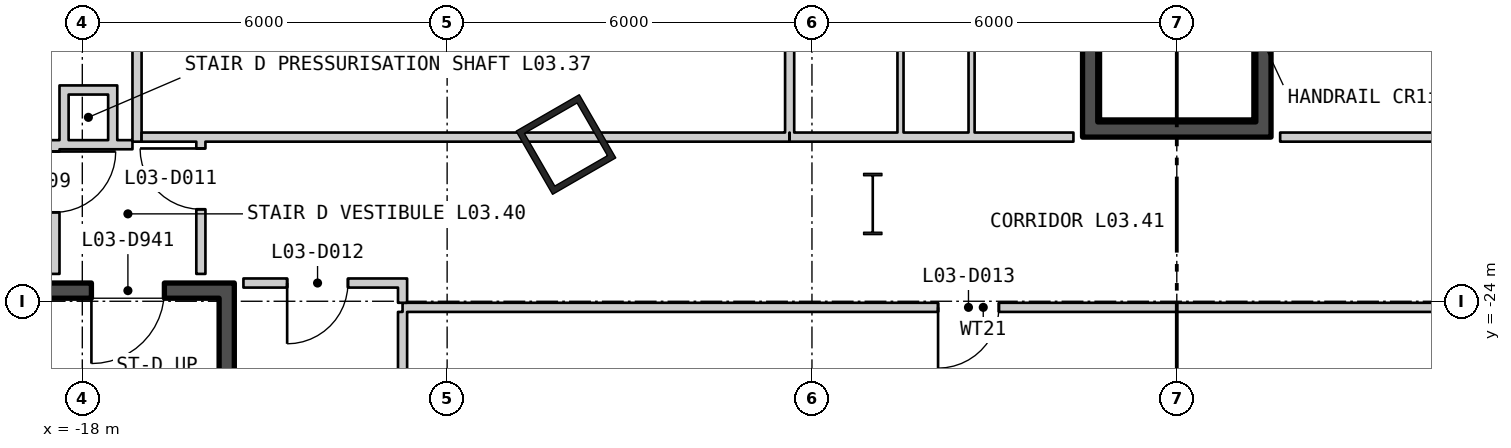
"""IFC4 building model, lengths in metres.
Left out: names, types, materials, properties, quantities, classifications, styles, units other than length and angle.
Written with IfcOpenShell. Run it as: python <this file> out.ifc"""

import sys

from ifc_helpers import new_model, si_unit, direction, frame, frame_2d, origin, origin_2d, place, context, subcontext, project, spatial, rectangle, hollow_rectangle, i_section, extrude, element, fill, save


model = new_model("IFC4")
c1 = context("Model", 3, precision=1e-05, world=origin(), true_north=direction((0.0, 1.0)))
c2 = subcontext(c1, "Body", "Model", "MODEL_VIEW")
j1 = project(units=[si_unit("LENGTHUNIT", "METRE"), si_unit("PLANEANGLEUNIT", "RADIAN")], contexts=[c1])
p1 = place(None, origin())
s1 = spatial("IfcSite", under=j1, at=p1, CompositionType="ELEMENT")
p2 = place(p1, origin())
s2 = spatial("IfcBuilding", under=s1, at=p2, CompositionType="ELEMENT")
p3 = place(p2, frame((0.0, 0.0, 18.6)))
s3 = spatial("IfcBuildingStorey", under=s2, at=p3, CompositionType="ELEMENT", Elevation=18.6)
p4 = place(p3, frame((-10.046, -21.422, 0.0), z_axis=(0.0, 0.0, 1.0), x_axis=(0.5, -0.866025403784, 0.0)))
e1 = element("IfcColumn", 1, at=p4, inside=s3, PredefinedType="COLUMN", context=c2, shape_type="SweptSolid", body=[
    extrude(hollow_rectangle(XDim=1.2, YDim=1.2, WallThickness=0.1, at=origin_2d()), origin(), (0.0, 0.0, 1.0), 5.1),
])
p5 = place(p3, frame((-5.0, -22.4, 0.0), z_axis=(0.0, 0.0, 1.0), x_axis=(1.0, 0.0, 0.0)))
e2 = element("IfcColumn", 2, at=p5, inside=s3, PredefinedType="COLUMN", context=c2, shape_type="SweptSolid", body=[
    extrude(i_section(OverallWidth=0.302, OverallDepth=1.008, WebThickness=0.021, FlangeThickness=0.04, at=origin_2d()), origin(), (0.0, 0.0, 1.0), 5.1),
])
p6 = place(p3, frame((-1.425, -21.05, 0.0), z_axis=(0.0, 0.0, 1.0), x_axis=(0.0, 1.0, 0.0)))
e3 = element("IfcWall", 3, at=p6, inside=s3, PredefinedType="SHEAR", context=c2, shape_type="SweptSolid", body=[
    extrude(rectangle(XDim=7.2, YDim=0.25, at=frame_2d((3.6, 0.0))), origin(), (0.0, 0.0, 1.0), 4.88),
])
p7 = place(p3, frame((1.425, -21.05, 0.0), z_axis=(0.0, 0.0, 1.0), x_axis=(0.0, 1.0, 0.0)))
e4 = element("IfcWall", 4, at=p7, inside=s3, PredefinedType="SHEAR", context=c2, shape_type="SweptSolid", body=[
    extrude(rectangle(XDim=7.2, YDim=0.25, at=frame_2d((3.6, 0.0))), origin(), (0.0, 0.0, 1.0), 4.88),
])
p8 = place(p7, frame((5.89, 0.0, 0.0)))
e5 = element("IfcOpeningElement", 5, at=p8, cuts=e4, PredefinedType="OPENING", context=c2, shape_type="SweptSolid", body=[
    extrude(rectangle(XDim=1.0, YDim=2.1, at=frame_2d((0.5, 1.05))), frame((0.0, 0.135, 0.0), z_axis=(0.0, -1.0, 0.0), x_axis=(1.0, 0.0, 0.0)), (0.0, 0.0, 1.0), 0.27),
])
p9 = place(p3, frame((-1.55, -21.175, 0.0), z_axis=(0.0, 0.0, 1.0), x_axis=(1.0, 0.0, 0.0)))
e6 = element("IfcWall", 6, at=p9, inside=s3, PredefinedType="SHEAR", context=c2, shape_type="SweptSolid", body=[
    extrude(rectangle(XDim=3.1, YDim=0.25, at=frame_2d((1.55, 0.0))), origin(), (0.0, 0.0, 1.0), 4.88),
])
p10 = place(p3, frame((-15.625, -31.25, 0.0), z_axis=(0.0, 0.0, 1.0), x_axis=(0.0, 1.0, 0.0)))
e7 = element("IfcWall", 7, at=p10, inside=s3, PredefinedType="SHEAR", context=c2, shape_type="SweptSolid", body=[
    extrude(rectangle(XDim=7.3, YDim=0.25, at=frame_2d((3.65, 0.0))), origin(), (0.0, 0.0, 1.0), 4.88),
])
p11 = place(p3, frame((-19.0, -23.825, 0.0), z_axis=(0.0, 0.0, 1.0), x_axis=(1.0, 0.0, 0.0)))
e8 = element("IfcWall", 8, at=p11, inside=s3, PredefinedType="SHEAR", context=c2, shape_type="SweptSolid", body=[
    extrude(rectangle(XDim=3.5, YDim=0.25, at=frame_2d((1.75, 0.0))), origin(), (0.0, 0.0, 1.0), 4.88),
])
p12 = place(p11, frame((1.15, 0.0, 0.0)))
e9 = element("IfcOpeningElement", 9, at=p12, cuts=e8, PredefinedType="OPENING", context=c2, shape_type="SweptSolid", body=[
    extrude(rectangle(XDim=1.2, YDim=2.1, at=frame_2d((0.6, 1.05))), frame((0.0, 0.135, 0.0), z_axis=(0.0, -1.0, 0.0), x_axis=(1.0, 0.0, 0.0)), (0.0, 0.0, 1.0), 0.27),
])
p13 = place(p3, frame((-18.45, -23.55, 0.0), z_axis=(0.0, 0.0, 1.0), x_axis=(0.0, 1.0, 0.0)))
e10 = element("IfcWall", 10, at=p13, inside=s3, PredefinedType="PARTITIONING", context=c2, shape_type="SweptSolid", body=[
    extrude(rectangle(XDim=2.2, YDim=0.15, at=frame_2d((1.1, 0.0))), origin(), (0.0, 0.0, 1.0), 4.88),
])
p14 = place(p13, frame((1.013, 0.0, 0.0)))
e11 = element("IfcOpeningElement", 11, at=p14, cuts=e10, PredefinedType="OPENING", context=c2, shape_type="SweptSolid", body=[
    extrude(rectangle(XDim=1.0, YDim=2.1, at=frame_2d((0.5, 1.05))), frame((0.0, 0.085, 0.0), z_axis=(0.0, -1.0, 0.0), x_axis=(1.0, 0.0, 0.0)), (0.0, 0.0, 1.0), 0.17),
])
p15 = place(p3, frame((-18.3, -21.5, 0.0), z_axis=(0.0, 0.0, 1.0), x_axis=(0.0, 1.0, 0.0)))
e12 = element("IfcWall", 12, at=p15, inside=s3, PredefinedType="PARTITIONING", context=c2, shape_type="SweptSolid", body=[
    extrude(rectangle(XDim=1.05, YDim=0.15, at=frame_2d((0.525, 0.0))), origin(), (0.0, 0.0, 1.0), 4.88),
])
for number, where, z_axis, x_axis in (
    (13, (-18.225, -21.425, 0.0), (0.0, 0.0, 1.0), (1.0, 0.0, 0.0)),
    (14, (-18.225, -20.525, 0.0), (0.0, 0.0, 1.0), (1.0, 0.0, 0.0)),
):
    element("IfcWall", number, at=place(p3, frame(where, z_axis=z_axis, x_axis=x_axis)), inside=s3, PredefinedType="PARTITIONING", context=c2, shape_type="SweptSolid", body=[
        extrude(rectangle(XDim=0.65, YDim=0.15, at=frame_2d((0.325, 0.0))), origin(), (0.0, 0.0, 1.0), 4.88),
    ])
p16 = place(p3, frame((-17.5, -21.5, 0.0), z_axis=(0.0, 0.0, 1.0), x_axis=(0.0, 1.0, 0.0)))
e15 = element("IfcWall", 15, at=p16, inside=s3, PredefinedType="PARTITIONING", context=c2, shape_type="SweptSolid", body=[
    extrude(rectangle(XDim=1.05, YDim=0.15, at=frame_2d((0.525, 0.0))), origin(), (0.0, 0.0, 1.0), 4.88),
])
p17 = place(p3, frame((-17.425, -21.425, 0.0), z_axis=(0.0, 0.0, 1.0), x_axis=(1.0, 0.0, 0.0)))
e16 = element("IfcWall", 16, at=p17, inside=s3, PredefinedType="PARTITIONING", context=c2, shape_type="SweptSolid", body=[
    extrude(rectangle(XDim=0.25, YDim=0.15, at=frame_2d((0.125, 0.0))), origin(), (0.0, 0.0, 1.0), 4.88),
])
p18 = place(p3, frame((-17.1, -21.375, 0.0), z_axis=(0.0, 0.0, 1.0), x_axis=(0.0, 1.0, 0.0)))
e17 = element("IfcWall", 17, at=p18, inside=s3, PredefinedType="PARTITIONING", context=c2, shape_type="SweptSolid", body=[
    extrude(rectangle(XDim=19.05, YDim=0.15, at=frame_2d((9.525, 0.0))), origin(), (0.0, 0.0, 1.0), 4.88),
])
p19 = place(p3, frame((-17.025, -21.3, 0.0), z_axis=(0.0, 0.0, 1.0), x_axis=(1.0, 0.0, 0.0)))
e18 = element("IfcWall", 18, at=p19, inside=s3, PredefinedType="PARTITIONING", context=c2, shape_type="SweptSolid", body=[
    extrude(rectangle(XDim=10.655, YDim=0.15, at=frame_2d((5.327, 0.0))), origin(), (0.0, 0.0, 1.0), 4.88),
])
p20 = place(p3, frame((-16.05, -23.55, 0.0), z_axis=(0.0, 0.0, 1.0), x_axis=(0.0, 1.0, 0.0)))
e19 = element("IfcWall", 19, at=p20, inside=s3, PredefinedType="PARTITIONING", context=c2, shape_type="SweptSolid", body=[
    extrude(rectangle(XDim=2.175, YDim=0.15, at=frame_2d((1.087, 0.0))), origin(), (0.0, 0.0, 1.0), 4.88),
])
p21 = place(p20, frame((1.063, 0.0, 0.0)))
e20 = element("IfcOpeningElement", 20, at=p21, cuts=e19, PredefinedType="OPENING", context=c2, shape_type="SweptSolid", body=[
    extrude(rectangle(XDim=1.0, YDim=2.1, at=frame_2d((0.5, 1.05))), frame((0.0, 0.085, 0.0), z_axis=(0.0, -1.0, 0.0), x_axis=(1.0, 0.0, 0.0)), (0.0, 0.0, 1.0), 0.17),
])
p22 = place(p3, frame((-15.35, -23.7, 0.0), z_axis=(0.0, 0.0, 1.0), x_axis=(1.0, 0.0, 0.0)))
e21 = element("IfcWall", 21, at=p22, inside=s3, PredefinedType="PARTITIONING", context=c2, shape_type="SweptSolid", body=[
    extrude(rectangle(XDim=2.542, YDim=0.15, at=frame_2d((1.271, 0.0))), origin(), (0.0, 0.0, 1.0), 4.88),
])
p23 = place(p22, frame((0.719, 0.0, 0.0)))
e22 = element("IfcOpeningElement", 22, at=p23, cuts=e21, PredefinedType="OPENING", context=c2, shape_type="SweptSolid", body=[
    extrude(rectangle(XDim=1.0, YDim=2.1, at=frame_2d((0.5, 1.05))), frame((0.0, 0.085, 0.0), z_axis=(0.0, -1.0, 0.0), x_axis=(1.0, 0.0, 0.0)), (0.0, 0.0, 1.0), 0.17),
])
p24 = place(p3, frame((-12.733, -32.9, 0.0), z_axis=(0.0, 0.0, 1.0), x_axis=(0.0, 1.0, 0.0)))
e23 = element("IfcWall", 23, at=p24, inside=s3, PredefinedType="PARTITIONING", context=c2, shape_type="SweptSolid", body=[
    extrude(rectangle(XDim=8.725, YDim=0.15, at=frame_2d((4.362, 0.0))), origin(), (0.0, 0.0, 1.0), 4.19),
])
p25 = place(p3, frame((-12.733, -24.1, 0.0), z_axis=(0.0, 0.0, 1.0), x_axis=(1.0, 0.0, 0.0)))
e24 = element("IfcWall", 24, at=p25, inside=s3, PredefinedType="PARTITIONING", context=c2, shape_type="SweptSolid", body=[
    extrude(rectangle(XDim=19.1, YDim=0.15, at=frame_2d((9.55, 0.0))), origin(), (0.0, 0.0, 1.0), 4.88),
])
p26 = place(p25, frame((8.807, 0.0, 0.0)))
e25 = element("IfcOpeningElement", 25, at=p26, cuts=e24, PredefinedType="OPENING", context=c2, shape_type="SweptSolid", body=[
    extrude(rectangle(XDim=1.0, YDim=2.1, at=frame_2d((0.5, 1.05))), frame((0.0, 0.085, 0.0), z_axis=(0.0, -1.0, 0.0), x_axis=(1.0, 0.0, 0.0)), (0.0, 0.0, 1.0), 0.17),
])
p27 = place(p3, frame((-12.733, -24.025, 0.0), z_axis=(0.0, 0.0, 1.0), x_axis=(0.0, 1.0, 0.0)))
e26 = element("IfcWall", 26, at=p27, inside=s3, PredefinedType="PARTITIONING", context=c2, shape_type="SweptSolid", body=[
    extrude(rectangle(XDim=0.4, YDim=0.15, at=frame_2d((0.2, 0.0))), origin(), (0.0, 0.0, 1.0), 4.88),
])
p28 = place(p3, frame((-6.367, -21.3, 0.0), z_axis=(0.0, 0.0, 1.0), x_axis=(1.0, 0.0, 0.0)))
e27 = element("IfcWall", 27, at=p28, inside=s3, PredefinedType="PARTITIONING", context=c2, shape_type="SweptSolid", body=[
    extrude(rectangle(XDim=4.667, YDim=0.15, at=frame_2d((2.333, 0.0))), origin(), (0.0, 0.0, 1.0), 4.88),
])
p29 = place(p3, frame((-6.367, -21.225, 0.0), z_axis=(0.0, 0.0, 1.0), x_axis=(0.0, 1.0, 0.0)))
e28 = element("IfcWall", 28, at=p29, inside=s3, PredefinedType="PARTITIONING", context=c2, shape_type="SweptSolid", body=[
    extrude(rectangle(XDim=7.622, YDim=0.15, at=frame_2d((3.811, 0.0))), origin(), (0.0, 0.0, 1.0), 4.28),
])
for number, where, z_axis, x_axis in (
    (29, (-4.544, -21.225, 0.0), (0.0, 0.0, 1.0), (0.0, 1.0, 0.0)),
    (30, (-3.375, -21.225, 0.0), (0.0, 0.0, 1.0), (0.0, 1.0, 0.0)),
):
    element("IfcWall", number, at=place(p3, frame(where, z_axis=z_axis, x_axis=x_axis)), inside=s3, PredefinedType="PARTITIONING", context=c2, shape_type="SweptSolid", body=[
        extrude(rectangle(XDim=7.55, YDim=0.1, at=frame_2d((3.775, 0.0))), origin(), (0.0, 0.0, 1.0), 4.88),
    ])
p30 = place(p3, frame((1.7, -21.3, 0.0), z_axis=(0.0, 0.0, 1.0), x_axis=(1.0, 0.0, 0.0)))
e31 = element("IfcWall", 31, at=p30, inside=s3, PredefinedType="PARTITIONING", context=c2, shape_type="SweptSolid", body=[
    extrude(rectangle(XDim=15.325, YDim=0.15, at=frame_2d((7.662, 0.0))), origin(), (0.0, 0.0, 1.0), 4.88),
])
p31 = place(p12, origin())
e32 = element("IfcDoor", 32, at=p31, inside=s3, OperationType="SINGLE_SWING_LEFT", PredefinedType="DOOR", context=c2, shape_type="SweptSolid", body=[
    extrude(rectangle(XDim=1.2, YDim=2.1, at=frame_2d((0.6, 1.05))), frame((0.0, 0.025, 0.0), z_axis=(0.0, -1.0, 0.0), x_axis=(1.0, 0.0, 0.0)), (0.0, 0.0, 1.0), 0.05),
])
fill(e9, e32)
p32 = place(p14, origin())
e33 = element("IfcDoor", 33, at=p32, inside=s3, OperationType="SINGLE_SWING_RIGHT", PredefinedType="DOOR", context=c2, shape_type="SweptSolid", body=[
    extrude(rectangle(XDim=1.0, YDim=2.1, at=frame_2d((0.5, 1.05))), frame((0.0, 0.025, 0.0), z_axis=(0.0, -1.0, 0.0), x_axis=(1.0, 0.0, 0.0)), (0.0, 0.0, 1.0), 0.05),
])
fill(e11, e33)
p33 = place(p21, origin())
e34 = element("IfcDoor", 34, at=p33, inside=s3, OperationType="SINGLE_SWING_LEFT", PredefinedType="DOOR", context=c2, shape_type="SweptSolid", body=[
    extrude(rectangle(XDim=1.0, YDim=2.1, at=frame_2d((0.5, 1.05))), frame((0.0, 0.025, 0.0), z_axis=(0.0, -1.0, 0.0), x_axis=(1.0, 0.0, 0.0)), (0.0, 0.0, 1.0), 0.05),
])
fill(e20, e34)
p34 = place(p23, origin())
e35 = element("IfcDoor", 35, at=p34, inside=s3, OperationType="SINGLE_SWING_LEFT", PredefinedType="DOOR", context=c2, shape_type="SweptSolid", body=[
    extrude(rectangle(XDim=1.0, YDim=2.1, at=frame_2d((0.5, 1.05))), frame((0.0, 0.025, 0.0), z_axis=(0.0, -1.0, 0.0), x_axis=(1.0, 0.0, 0.0)), (0.0, 0.0, 1.0), 0.05),
])
fill(e22, e35)
p35 = place(p26, origin())
e36 = element("IfcDoor", 36, at=p35, inside=s3, OperationType="SINGLE_SWING_LEFT", PredefinedType="DOOR", context=c2, shape_type="SweptSolid", body=[
    extrude(rectangle(XDim=1.0, YDim=2.1, at=frame_2d((0.5, 1.05))), frame((0.0, 0.025, 0.0), z_axis=(0.0, -1.0, 0.0), x_axis=(1.0, 0.0, 0.0)), (0.0, 0.0, 1.0), 0.05),
])
fill(e25, e36)
save(model, sys.argv[1])
